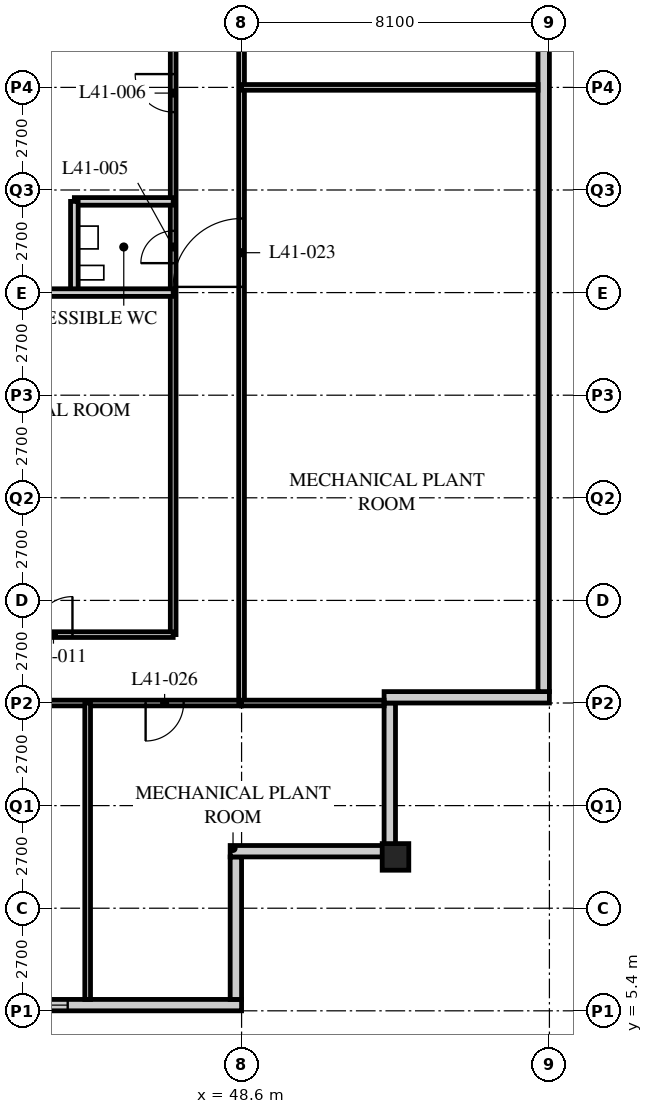
"""IFC4 building model, lengths in metres.
Left out: names, types, materials, properties, quantities, classifications, styles, units other than length and angle.
Written with IfcOpenShell. Run it as: python <this file> out.ifc"""

import sys

from ifc_helpers import new_model, si_unit, direction, frame, frame_2d, origin, origin_2d, place, context, subcontext, project, spatial, rectangle, hollow_rectangle, extrude, element, fill, save


model = new_model("IFC4")
c1 = context("Model", 3, precision=1e-05, world=origin(), true_north=direction((0.0, 1.0)))
c2 = subcontext(c1, "Body", "Model", "MODEL_VIEW")
j1 = project(units=[si_unit("LENGTHUNIT", "METRE"), si_unit("PLANEANGLEUNIT", "RADIAN")], contexts=[c1])
p1 = place(None, origin())
s1 = spatial("IfcSite", under=j1, at=p1, CompositionType="ELEMENT")
p2 = place(p1, origin())
s2 = spatial("IfcBuilding", under=s1, at=p2, CompositionType="ELEMENT")
p3 = place(p2, frame((0.0, 0.0, 157.8)))
s3 = spatial("IfcBuildingStorey", under=s2, at=p3, CompositionType="ELEMENT", Elevation=157.8)
p4 = place(p3, frame((52.65, 9.45, 0.0), z_axis=(0.0, 0.0, 1.0), x_axis=(1.0, 0.0, 0.0)))
e1 = element("IfcColumn", 1, at=p4, inside=s3, PredefinedType="COLUMN", context=c2, shape_type="SweptSolid", body=[
    extrude(hollow_rectangle(XDim=0.7, YDim=0.7, WallThickness=0.07, at=origin_2d()), origin(), (0.0, 0.0, 1.0), 7.2),
])
p5 = place(p3, frame((8.4, 5.55, 0.0), z_axis=(0.0, 0.0, 1.0), x_axis=(1.0, 0.0, 0.0)))
e2 = element("IfcWall", 2, at=p5, inside=s3, PredefinedType="SOLIDWALL", context=c2, shape_type="SweptSolid", body=[
    extrude(rectangle(XDim=40.2, YDim=0.3, at=frame_2d((20.1, 0.0))), origin(), (0.0, 0.0, 1.0), 5.95),
])
p6 = place(p5, frame((4.275, 0.0, 1.0)))
e3 = element("IfcOpeningElement", 3, at=p6, cuts=e2, PredefinedType="OPENING", context=c2, shape_type="SweptSolid", body=[
    extrude(rectangle(XDim=3.0, YDim=1.8, at=frame_2d((1.5, 0.9))), frame((0.0, 0.16, 0.0), z_axis=(0.0, -1.0, 0.0), x_axis=(1.0, 0.0, 0.0)), (0.0, 0.0, 1.0), 0.32),
])
p7 = place(p5, frame((12.375, 0.0, 1.0)))
e4 = element("IfcOpeningElement", 4, at=p7, cuts=e2, PredefinedType="OPENING", context=c2, shape_type="SweptSolid", body=[
    extrude(rectangle(XDim=3.0, YDim=1.8, at=frame_2d((1.5, 0.9))), frame((0.0, 0.16, 0.0), z_axis=(0.0, -1.0, 0.0), x_axis=(1.0, 0.0, 0.0)), (0.0, 0.0, 1.0), 0.32),
])
p8 = place(p5, frame((24.525, 0.0, 1.0)))
e5 = element("IfcOpeningElement", 5, at=p8, cuts=e2, PredefinedType="OPENING", context=c2, shape_type="SweptSolid", body=[
    extrude(rectangle(XDim=3.0, YDim=1.8, at=frame_2d((1.5, 0.9))), frame((0.0, 0.16, 0.0), z_axis=(0.0, -1.0, 0.0), x_axis=(1.0, 0.0, 0.0)), (0.0, 0.0, 1.0), 0.32),
])
p9 = place(p5, frame((32.625, 0.0, 1.0)))
e6 = element("IfcOpeningElement", 6, at=p9, cuts=e2, PredefinedType="OPENING", context=c2, shape_type="SweptSolid", body=[
    extrude(rectangle(XDim=3.0, YDim=1.8, at=frame_2d((1.5, 0.9))), frame((0.0, 0.16, 0.0), z_axis=(0.0, -1.0, 0.0), x_axis=(1.0, 0.0, 0.0)), (0.0, 0.0, 1.0), 0.32),
])
p10 = place(p3, frame((48.45, 5.7, 0.0), z_axis=(0.0, 0.0, 1.0), x_axis=(0.0, 1.0, 0.0)))
e7 = element("IfcWall", 7, at=p10, inside=s3, PredefinedType="SOLIDWALL", context=c2, shape_type="SweptSolid", body=[
    extrude(rectangle(XDim=3.75, YDim=0.3, at=frame_2d((1.875, 0.0))), origin(), (0.0, 0.0, 1.0), 5.95),
])
p11 = place(p3, frame((48.3, 9.6, 0.0), z_axis=(0.0, 0.0, 1.0), x_axis=(1.0, 0.0, 0.0)))
e8 = element("IfcWall", 8, at=p11, inside=s3, PredefinedType="SOLIDWALL", context=c2, shape_type="SweptSolid", body=[
    extrude(rectangle(XDim=4.35, YDim=0.3, at=frame_2d((2.175, 0.0))), origin(), (0.0, 0.0, 1.0), 6.25),
])
p12 = place(p3, frame((52.5, 9.75, 0.0), z_axis=(0.0, 0.0, 1.0), x_axis=(0.0, 1.0, 0.0)))
e9 = element("IfcWall", 9, at=p12, inside=s3, PredefinedType="SOLIDWALL", context=c2, shape_type="SweptSolid", body=[
    extrude(rectangle(XDim=3.75, YDim=0.3, at=frame_2d((1.875, 0.0))), origin(), (0.0, 0.0, 1.0), 6.25),
])
p13 = place(p3, frame((52.35, 13.65, 0.0), z_axis=(0.0, 0.0, 1.0), x_axis=(1.0, 0.0, 0.0)))
e10 = element("IfcWall", 10, at=p13, inside=s3, PredefinedType="SOLIDWALL", context=c2, shape_type="SweptSolid", body=[
    extrude(rectangle(XDim=4.35, YDim=0.3, at=frame_2d((2.175, 0.0))), origin(), (0.0, 0.0, 1.0), 6.95),
])
p14 = place(p3, frame((56.55, 13.8, 0.0), z_axis=(0.0, 0.0, 1.0), x_axis=(0.0, 1.0, 0.0)))
e11 = element("IfcWall", 11, at=p14, inside=s3, PredefinedType="SOLIDWALL", context=c2, shape_type="SweptSolid", body=[
    extrude(rectangle(XDim=32.1, YDim=0.3, at=frame_2d((16.05, 0.0))), origin(), (0.0, 0.0, 1.0), 5.95),
])
p15 = place(p3, frame((8.1, 13.5, 0.0), z_axis=(0.0, 0.0, 1.0), x_axis=(1.0, 0.0, 0.0)))
e12 = element("IfcWall", 12, at=p15, inside=s3, PredefinedType="PARTITIONING", context=c2, shape_type="SweptSolid", body=[
    extrude(rectangle(XDim=40.5, YDim=0.15, at=frame_2d((20.25, 0.0))), origin(), (0.0, 0.0, 1.0), 6.95),
])
p16 = place(p15, frame((11.25, 0.0, 0.0)))
e13 = element("IfcOpeningElement", 13, at=p16, cuts=e12, PredefinedType="OPENING", context=c2, shape_type="SweptSolid", body=[
    extrude(rectangle(XDim=1.8, YDim=2.4, at=frame_2d((0.9, 1.2))), frame((0.0, 0.085, 0.0), z_axis=(0.0, -1.0, 0.0), x_axis=(1.0, 0.0, 0.0)), (0.0, 0.0, 1.0), 0.17),
])
p17 = place(p15, frame((27.45, 0.0, 0.0)))
e14 = element("IfcOpeningElement", 14, at=p17, cuts=e12, PredefinedType="OPENING", context=c2, shape_type="SweptSolid", body=[
    extrude(rectangle(XDim=1.8, YDim=2.4, at=frame_2d((0.9, 1.2))), frame((0.0, 0.085, 0.0), z_axis=(0.0, -1.0, 0.0), x_axis=(1.0, 0.0, 0.0)), (0.0, 0.0, 1.0), 0.17),
])
p18 = place(p15, frame((1.525, 0.0, 0.0)))
e15 = element("IfcOpeningElement", 15, at=p18, cuts=e12, PredefinedType="OPENING", context=c2, shape_type="SweptSolid", body=[
    extrude(rectangle(XDim=1.0, YDim=2.1, at=frame_2d((0.5, 1.05))), frame((0.0, 0.085, 0.0), z_axis=(0.0, -1.0, 0.0), x_axis=(1.0, 0.0, 0.0)), (0.0, 0.0, 1.0), 0.17),
])
p19 = place(p15, frame((37.975, 0.0, 0.0)))
e16 = element("IfcOpeningElement", 16, at=p19, cuts=e12, PredefinedType="OPENING", context=c2, shape_type="SweptSolid", body=[
    extrude(rectangle(XDim=1.0, YDim=2.1, at=frame_2d((0.5, 1.05))), frame((0.0, 0.085, 0.0), z_axis=(0.0, -1.0, 0.0), x_axis=(1.0, 0.0, 0.0)), (0.0, 0.0, 1.0), 0.17),
])
p20 = place(p3, frame((48.6, 13.5, 0.0), z_axis=(0.0, 0.0, 1.0), x_axis=(0.0, 1.0, 0.0)))
e17 = element("IfcWall", 17, at=p20, inside=s3, PredefinedType="PARTITIONING", context=c2, shape_type="SweptSolid", body=[
    extrude(rectangle(XDim=32.4, YDim=0.15, at=frame_2d((16.2, 0.0))), origin(), (0.0, 0.0, 1.0), 5.95),
])
p21 = place(p20, frame((10.95, 0.0, 0.0)))
e18 = element("IfcOpeningElement", 18, at=p21, cuts=e17, PredefinedType="OPENING", context=c2, shape_type="SweptSolid", body=[
    extrude(rectangle(XDim=1.8, YDim=2.4, at=frame_2d((0.9, 1.2))), frame((0.0, 0.085, 0.0), z_axis=(0.0, -1.0, 0.0), x_axis=(1.0, 0.0, 0.0)), (0.0, 0.0, 1.0), 0.17),
])
p22 = place(p20, frame((27.15, 0.0, 0.0)))
e19 = element("IfcOpeningElement", 19, at=p22, cuts=e17, PredefinedType="OPENING", context=c2, shape_type="SweptSolid", body=[
    extrude(rectangle(XDim=1.8, YDim=2.4, at=frame_2d((0.9, 1.2))), frame((0.0, 0.085, 0.0), z_axis=(0.0, -1.0, 0.0), x_axis=(1.0, 0.0, 0.0)), (0.0, 0.0, 1.0), 0.17),
])
p23 = place(p3, frame((46.8, 15.3, 0.0), z_axis=(0.0, 0.0, 1.0), x_axis=(0.0, 1.0, 0.0)))
e20 = element("IfcWall", 20, at=p23, inside=s3, PredefinedType="PARTITIONING", context=c2, shape_type="SweptSolid", body=[
    extrude(rectangle(XDim=28.8, YDim=0.15, at=frame_2d((14.4, 0.0))), origin(), (0.0, 0.0, 1.0), 6.95),
])
p24 = place(p23, frame((9.775, 0.0, 0.0)))
e21 = element("IfcOpeningElement", 21, at=p24, cuts=e20, PredefinedType="OPENING", context=c2, shape_type="SweptSolid", body=[
    extrude(rectangle(XDim=0.85, YDim=2.1, at=frame_2d((0.425, 1.05))), frame((0.0, 0.085, 0.0), z_axis=(0.0, -1.0, 0.0), x_axis=(1.0, 0.0, 0.0)), (0.0, 0.0, 1.0), 0.17),
])
p25 = place(p23, frame((13.75, 0.0, 0.0)))
e22 = element("IfcOpeningElement", 22, at=p25, cuts=e20, PredefinedType="OPENING", context=c2, shape_type="SweptSolid", body=[
    extrude(rectangle(XDim=1.0, YDim=2.1, at=frame_2d((0.5, 1.05))), frame((0.0, 0.085, 0.0), z_axis=(0.0, -1.0, 0.0), x_axis=(1.0, 0.0, 0.0)), (0.0, 0.0, 1.0), 0.17),
])
p26 = place(p23, frame((20.65, 0.0, 0.0)))
e23 = element("IfcOpeningElement", 23, at=p26, cuts=e20, PredefinedType="OPENING", context=c2, shape_type="SweptSolid", body=[
    extrude(rectangle(XDim=1.0, YDim=2.1, at=frame_2d((0.5, 1.05))), frame((0.0, 0.085, 0.0), z_axis=(0.0, -1.0, 0.0), x_axis=(1.0, 0.0, 0.0)), (0.0, 0.0, 1.0), 0.17),
])
p27 = place(p3, frame((29.56, 15.3, 0.0), z_axis=(0.0, 0.0, 1.0), x_axis=(1.0, 0.0, 0.0)))
e24 = element("IfcWall", 24, at=p27, inside=s3, PredefinedType="PARTITIONING", context=c2, shape_type="SweptSolid", body=[
    extrude(rectangle(XDim=17.24, YDim=0.15, at=frame_2d((8.62, 0.0))), origin(), (0.0, 0.0, 1.0), 6.95),
])
p28 = place(p27, frame((4.965, 0.0, 0.0)))
e25 = element("IfcOpeningElement", 25, at=p28, cuts=e24, PredefinedType="OPENING", context=c2, shape_type="SweptSolid", body=[
    extrude(rectangle(XDim=1.0, YDim=2.1, at=frame_2d((0.5, 1.05))), frame((0.0, 0.085, 0.0), z_axis=(0.0, -1.0, 0.0), x_axis=(1.0, 0.0, 0.0)), (0.0, 0.0, 1.0), 0.17),
])
p29 = place(p27, frame((13.59, 0.0, 0.0)))
e26 = element("IfcOpeningElement", 26, at=p29, cuts=e24, PredefinedType="OPENING", context=c2, shape_type="SweptSolid", body=[
    extrude(rectangle(XDim=1.0, YDim=2.1, at=frame_2d((0.5, 1.05))), frame((0.0, 0.085, 0.0), z_axis=(0.0, -1.0, 0.0), x_axis=(1.0, 0.0, 0.0)), (0.0, 0.0, 1.0), 0.17),
])
p30 = place(p3, frame((46.8, 26.7, 0.0), z_axis=(0.0, 0.0, 1.0), x_axis=(-1.0, 0.0, 0.0)))
e27 = element("IfcWall", 27, at=p30, inside=s3, PredefinedType="SOLIDWALL", context=c2, shape_type="SweptSolid", body=[
    extrude(rectangle(XDim=2.6, YDim=0.2, at=frame_2d((1.3, 0.0))), origin(), (0.0, 0.0, 1.0), 6.25),
])
p31 = place(p3, frame((44.2, 24.3, 0.0), z_axis=(0.0, 0.0, 1.0), x_axis=(0.0, 1.0, 0.0)))
e28 = element("IfcWall", 28, at=p31, inside=s3, PredefinedType="SOLIDWALL", context=c2, shape_type="SweptSolid", body=[
    extrude(rectangle(XDim=2.4, YDim=0.2, at=frame_2d((1.2, 0.0))), origin(), (0.0, 0.0, 1.0), 6.95),
])
p32 = place(p3, frame((40.5, 24.3, 0.0), z_axis=(0.0, 0.0, 1.0), x_axis=(1.0, 0.0, 0.0)))
e29 = element("IfcWall", 29, at=p32, inside=s3, PredefinedType="SOLIDWALL", context=c2, shape_type="SweptSolid", body=[
    extrude(rectangle(XDim=6.3, YDim=0.2, at=frame_2d((3.15, 0.0))), origin(), (0.0, 0.0, 1.0), 6.95),
])
p33 = place(p3, frame((48.6, 29.7, 0.0), z_axis=(0.0, 0.0, 1.0), x_axis=(1.0, 0.0, 0.0)))
e30 = element("IfcWall", 30, at=p33, inside=s3, PredefinedType="PARTITIONING", context=c2, shape_type="SweptSolid", body=[
    extrude(rectangle(XDim=7.8, YDim=0.15, at=frame_2d((3.9, 0.0))), origin(), (0.0, 0.0, 1.0), 6.95),
])
p34 = place(p3, frame((48.6, 13.5, 0.0), z_axis=(0.0, 0.0, 1.0), x_axis=(1.0, 0.0, 0.0)))
e31 = element("IfcWall", 31, at=p34, inside=s3, PredefinedType="PARTITIONING", context=c2, shape_type="SweptSolid", body=[
    extrude(rectangle(XDim=3.75, YDim=0.15, at=frame_2d((1.875, 0.0))), origin(), (0.0, 0.0, 1.0), 6.95),
])
p35 = place(p3, frame((44.55, 13.5, 0.0), z_axis=(0.0, 0.0, 1.0), x_axis=(0.0, -1.0, 0.0)))
e32 = element("IfcWall", 32, at=p35, inside=s3, PredefinedType="PARTITIONING", context=c2, shape_type="SweptSolid", body=[
    extrude(rectangle(XDim=7.8, YDim=0.15, at=frame_2d((3.9, 0.0))), origin(), (0.0, 0.0, 1.0), 6.95),
])
p36 = place(p9, origin())
e33 = element("IfcWindow", 33, at=p36, inside=s3, PartitioningType="SINGLE_PANEL", PredefinedType="USERDEFINED", context=c2, shape_type="SweptSolid", body=[
    extrude(rectangle(XDim=3.0, YDim=1.8, at=frame_2d((1.5, 0.9))), frame((0.0, 0.075, 0.0), z_axis=(0.0, -1.0, 0.0), x_axis=(1.0, 0.0, 0.0)), (0.0, 0.0, 1.0), 0.15),
])
fill(e6, e33)
p37 = place(p24, origin())
e34 = element("IfcDoor", 34, at=p37, inside=s3, OperationType="SINGLE_SWING_LEFT", PredefinedType="DOOR", context=c2, shape_type="SweptSolid", body=[
    extrude(rectangle(XDim=0.85, YDim=2.1, at=frame_2d((0.425, 1.05))), frame((0.0, 0.025, 0.0), z_axis=(0.0, -1.0, 0.0), x_axis=(1.0, 0.0, 0.0)), (0.0, 0.0, 1.0), 0.05),
])
fill(e21, e34)
p38 = place(p25, origin())
e35 = element("IfcDoor", 35, at=p38, inside=s3, OperationType="SINGLE_SWING_RIGHT", PredefinedType="DOOR", context=c2, shape_type="SweptSolid", body=[
    extrude(rectangle(XDim=1.0, YDim=2.1, at=frame_2d((0.5, 1.05))), frame((0.0, 0.025, 0.0), z_axis=(0.0, -1.0, 0.0), x_axis=(1.0, 0.0, 0.0)), (0.0, 0.0, 1.0), 0.05),
])
fill(e22, e35)
p39 = place(p29, origin())
e36 = element("IfcDoor", 36, at=p39, inside=s3, OperationType="SINGLE_SWING_RIGHT", PredefinedType="DOOR", context=c2, shape_type="SweptSolid", body=[
    extrude(rectangle(XDim=1.0, YDim=2.1, at=frame_2d((0.5, 1.05))), frame((0.0, 0.025, 0.0), z_axis=(0.0, -1.0, 0.0), x_axis=(1.0, 0.0, 0.0)), (0.0, 0.0, 1.0), 0.05),
])
fill(e26, e36)
p40 = place(p21, origin())
e37 = element("IfcDoor", 37, at=p40, inside=s3, OperationType="DOUBLE_DOOR_SINGLE_SWING", PredefinedType="DOOR", context=c2, shape_type="SweptSolid", body=[
    extrude(rectangle(XDim=1.8, YDim=2.4, at=frame_2d((0.9, 1.2))), frame((0.0, 0.025, 0.0), z_axis=(0.0, -1.0, 0.0), x_axis=(1.0, 0.0, 0.0)), (0.0, 0.0, 1.0), 0.05),
])
fill(e18, e37)
p41 = place(p19, origin())
e38 = element("IfcDoor", 38, at=p41, inside=s3, OperationType="SINGLE_SWING_RIGHT", PredefinedType="DOOR", context=c2, shape_type="SweptSolid", body=[
    extrude(rectangle(XDim=1.0, YDim=2.1, at=frame_2d((0.5, 1.05))), frame((0.0, 0.025, 0.0), z_axis=(0.0, -1.0, 0.0), x_axis=(1.0, 0.0, 0.0)), (0.0, 0.0, 1.0), 0.05),
])
fill(e16, e38)
save(model, sys.argv[1])
